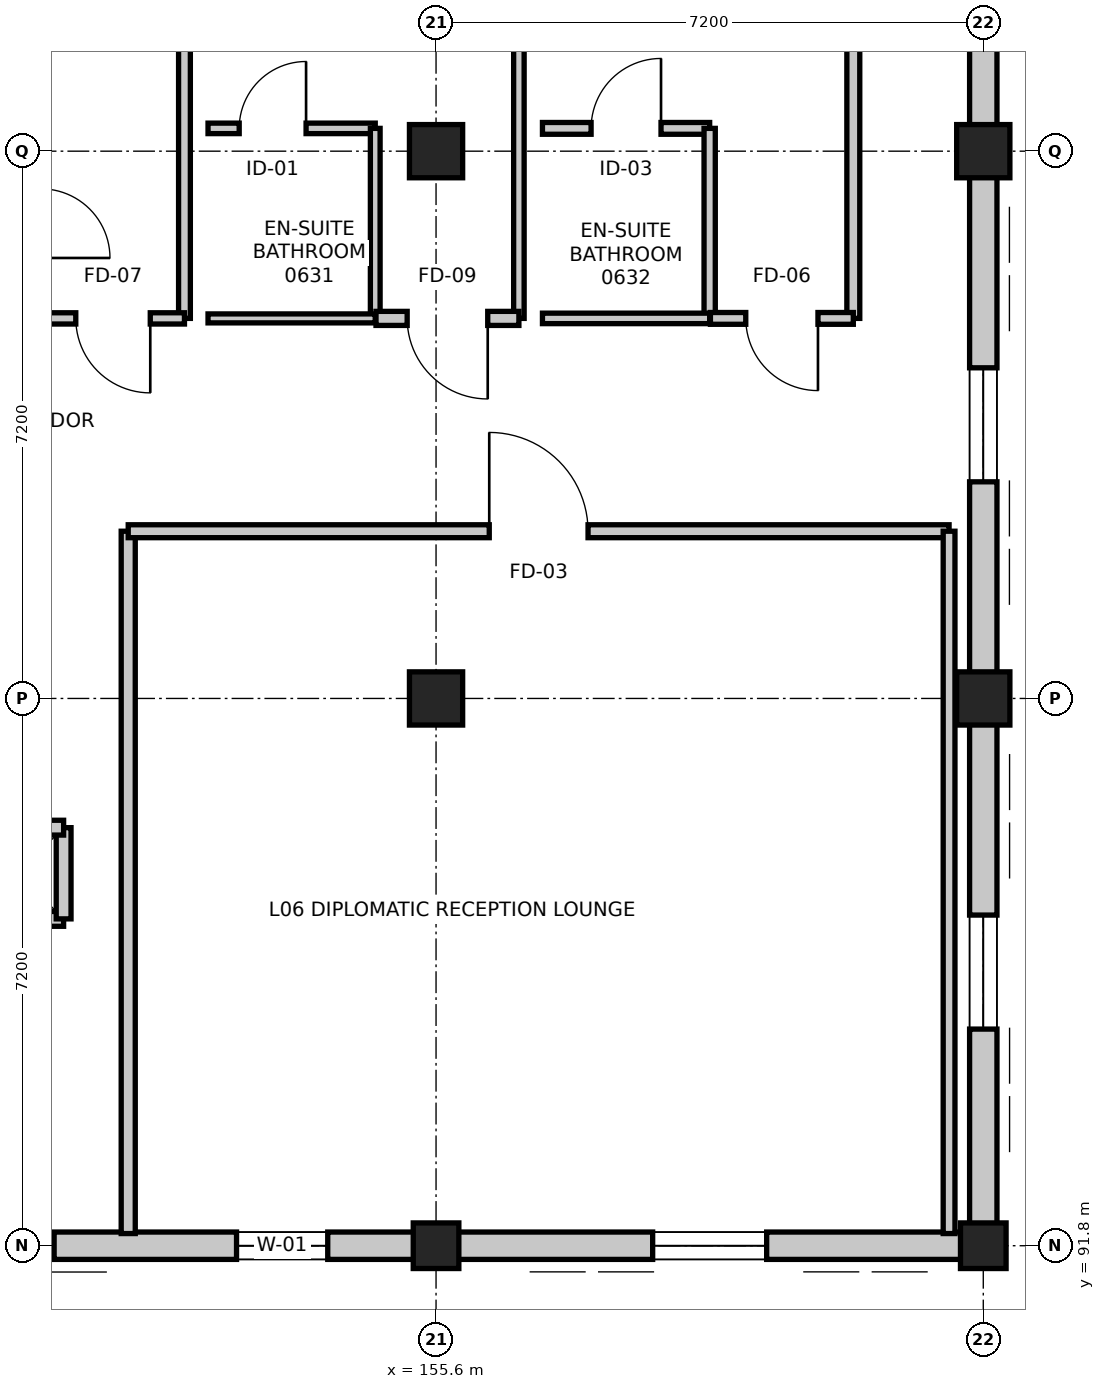
"""IFC4 building model, lengths in metres.
Left out: names, types, materials, properties, quantities, classifications, styles, units other than length and angle.
Written with IfcOpenShell. Run it as: python <this file> out.ifc"""

import sys

from ifc_helpers import new_model, si_unit, direction, frame, frame_2d, origin, origin_2d, place, context, subcontext, project, spatial, rectangle, extrude, element, fill, save


model = new_model("IFC4")
c1 = context("Model", 3, precision=1e-05, world=origin(), true_north=direction((0.0, 1.0)))
c2 = subcontext(c1, "Body", "Model", "MODEL_VIEW")
j1 = project(units=[si_unit("LENGTHUNIT", "METRE"), si_unit("PLANEANGLEUNIT", "RADIAN")], contexts=[c1])
p1 = place(None, origin())
s1 = spatial("IfcSite", under=j1, at=p1, CompositionType="ELEMENT")
p2 = place(p1, origin())
s2 = spatial("IfcBuilding", under=s1, at=p2, CompositionType="ELEMENT")
p3 = place(p2, frame((0.0, 0.0, 26.4)))
s3 = spatial("IfcBuildingStorey", under=s2, at=p3, CompositionType="ELEMENT", Elevation=26.4)
p4 = place(p3, frame((155.6, 91.8, 0.0), z_axis=(0.0, 0.0, 1.0), x_axis=(1.0, 0.0, 0.0)))
e1 = element("IfcColumn", 1, at=p4, inside=s3, PredefinedType="COLUMN", context=c2, shape_type="SweptSolid", body=[
    extrude(rectangle(XDim=0.6, YDim=0.6, at=origin_2d()), origin(), (0.0, 0.0, 1.0), 3.6),
])
for number, where, z_axis, x_axis in (
    (2, (155.6, 99.0, 0.0), (0.0, 0.0, 1.0), (1.0, 0.0, 0.0)),
    (3, (155.6, 106.2, 0.0), (0.0, 0.0, 1.0), (1.0, 0.0, 0.0)),
):
    element("IfcColumn", number, at=place(p3, frame(where, z_axis=z_axis, x_axis=x_axis)), inside=s3, PredefinedType="COLUMN", context=c2, shape_type="SweptSolid", body=[
        extrude(rectangle(XDim=0.7, YDim=0.7, at=origin_2d()), origin(), (0.0, 0.0, 1.0), 3.6),
    ])
p5 = place(p3, frame((162.8, 91.8, 0.0), z_axis=(0.0, 0.0, 1.0), x_axis=(1.0, 0.0, 0.0)))
e4 = element("IfcColumn", 4, at=p5, inside=s3, PredefinedType="COLUMN", context=c2, shape_type="SweptSolid", body=[
    extrude(rectangle(XDim=0.6, YDim=0.6, at=origin_2d()), origin(), (0.0, 0.0, 1.0), 3.6),
])
for number, where, z_axis, x_axis in (
    (5, (162.8, 99.0, 0.0), (0.0, 0.0, 1.0), (1.0, 0.0, 0.0)),
    (6, (162.8, 106.2, 0.0), (0.0, 0.0, 1.0), (1.0, 0.0, 0.0)),
):
    element("IfcColumn", number, at=place(p3, frame(where, z_axis=z_axis, x_axis=x_axis)), inside=s3, PredefinedType="COLUMN", context=c2, shape_type="SweptSolid", body=[
        extrude(rectangle(XDim=0.7, YDim=0.7, at=origin_2d()), origin(), (0.0, 0.0, 1.0), 3.6),
    ])
p6 = place(p3, frame((162.8, 113.4, 0.0), z_axis=(0.0, 0.0, 1.0), x_axis=(0.0, -1.0, 0.0)))
e7 = element("IfcWall", 7, at=p6, inside=s3, PredefinedType="STANDARD", context=c2, shape_type="SweptSolid", body=[
    extrude(rectangle(XDim=7.2, YDim=0.36, at=frame_2d((3.6, 0.0))), origin(), (0.0, 0.0, 1.0), 2.685),
])
p7 = place(p6, frame((2.85, 0.0, 0.75)))
e8 = element("IfcOpeningElement", 8, at=p7, cuts=e7, PredefinedType="OPENING", context=c2, shape_type="SweptSolid", body=[
    extrude(rectangle(XDim=1.5, YDim=1.5, at=frame_2d((0.75, 0.75))), frame((0.0, 0.19, 0.0), z_axis=(0.0, -1.0, 0.0), x_axis=(1.0, 0.0, 0.0)), (0.0, 0.0, 1.0), 0.38),
])
p8 = place(p3, frame((162.8, 106.2, 0.0), z_axis=(0.0, 0.0, 1.0), x_axis=(0.0, -1.0, 0.0)))
e9 = element("IfcWall", 9, at=p8, inside=s3, PredefinedType="STANDARD", context=c2, shape_type="SweptSolid", body=[
    extrude(rectangle(XDim=7.2, YDim=0.36, at=frame_2d((3.6, 0.0))), origin(), (0.0, 0.0, 1.0), 2.685),
])
p9 = place(p8, frame((2.85, 0.0, 0.75)))
e10 = element("IfcOpeningElement", 10, at=p9, cuts=e9, PredefinedType="OPENING", context=c2, shape_type="SweptSolid", body=[
    extrude(rectangle(XDim=1.5, YDim=1.5, at=frame_2d((0.75, 0.75))), frame((0.0, 0.19, 0.0), z_axis=(0.0, -1.0, 0.0), x_axis=(1.0, 0.0, 0.0)), (0.0, 0.0, 1.0), 0.38),
])
p10 = place(p3, frame((162.8, 99.0, 0.0), z_axis=(0.0, 0.0, 1.0), x_axis=(0.0, -1.0, 0.0)))
e11 = element("IfcWall", 11, at=p10, inside=s3, PredefinedType="STANDARD", context=c2, shape_type="SweptSolid", body=[
    extrude(rectangle(XDim=7.2, YDim=0.36, at=frame_2d((3.6, 0.0))), origin(), (0.0, 0.0, 1.0), 2.685),
])
p11 = place(p10, frame((2.85, 0.0, 0.75)))
e12 = element("IfcOpeningElement", 12, at=p11, cuts=e11, PredefinedType="OPENING", context=c2, shape_type="SweptSolid", body=[
    extrude(rectangle(XDim=1.5, YDim=1.5, at=frame_2d((0.75, 0.75))), frame((0.0, 0.19, 0.0), z_axis=(0.0, -1.0, 0.0), x_axis=(1.0, 0.0, 0.0)), (0.0, 0.0, 1.0), 0.38),
])
p12 = place(p3, frame((162.8, 91.8, 0.0), z_axis=(0.0, 0.0, 1.0), x_axis=(-1.0, 0.0, 0.0)))
e13 = element("IfcWall", 13, at=p12, inside=s3, PredefinedType="STANDARD", context=c2, shape_type="SweptSolid", body=[
    extrude(rectangle(XDim=7.2, YDim=0.36, at=frame_2d((3.6, 0.0))), origin(), (0.0, 0.0, 1.0), 2.735),
])
p13 = place(p12, frame((2.85, 0.0, 0.75)))
e14 = element("IfcOpeningElement", 14, at=p13, cuts=e13, PredefinedType="OPENING", context=c2, shape_type="SweptSolid", body=[
    extrude(rectangle(XDim=1.5, YDim=1.5, at=frame_2d((0.75, 0.75))), frame((0.0, 0.19, 0.0), z_axis=(0.0, -1.0, 0.0), x_axis=(1.0, 0.0, 0.0)), (0.0, 0.0, 1.0), 0.38),
])
p14 = place(p3, frame((155.6, 91.8, 0.0), z_axis=(0.0, 0.0, 1.0), x_axis=(-1.0, 0.0, 0.0)))
e15 = element("IfcWall", 15, at=p14, inside=s3, PredefinedType="STANDARD", context=c2, shape_type="SweptSolid", body=[
    extrude(rectangle(XDim=7.2, YDim=0.36, at=frame_2d((3.6, 0.0))), origin(), (0.0, 0.0, 1.0), 2.735),
])
p15 = place(p14, frame((1.425, 0.0, 0.75)))
e16 = element("IfcOpeningElement", 16, at=p15, cuts=e15, PredefinedType="OPENING", context=c2, shape_type="SweptSolid", body=[
    extrude(rectangle(XDim=1.2, YDim=1.5, at=frame_2d((0.6, 0.75))), frame((0.0, 0.19, 0.0), z_axis=(0.0, -1.0, 0.0), x_axis=(1.0, 0.0, 0.0)), (0.0, 0.0, 1.0), 0.38),
])
p16 = place(p14, frame((5.025, 0.0, 0.75)))
e17 = element("IfcOpeningElement", 17, at=p16, cuts=e15, PredefinedType="OPENING", context=c2, shape_type="SweptSolid", body=[
    extrude(rectangle(XDim=1.2, YDim=1.5, at=frame_2d((0.6, 0.75))), frame((0.0, 0.19, 0.0), z_axis=(0.0, -1.0, 0.0), x_axis=(1.0, 0.0, 0.0)), (0.0, 0.0, 1.0), 0.38),
])
for number, where, z_axis, x_axis in (
    (18, (149.5, 96.1, 0.0), (0.0, 0.0, 1.0), (1.0, 0.0, 0.0)),
    (19, (150.7, 96.1, 0.0), (0.0, 0.0, 1.0), (0.0, 1.0, 0.0)),
    (20, (150.7, 97.3, 0.0), (0.0, 0.0, 1.0), (-1.0, 0.0, 0.0)),
):
    element("IfcWall", number, at=place(p3, frame(where, z_axis=z_axis, x_axis=x_axis)), inside=s3, PredefinedType="PARAPET", context=c2, shape_type="SweptSolid", body=[
        extrude(rectangle(XDim=1.2, YDim=0.195, at=frame_2d((0.6, 0.0))), origin(), (0.0, 0.0, 1.0), 3.35),
    ])
p17 = place(p3, frame((151.55, 91.96, 0.0), z_axis=(0.0, 0.0, 1.0), x_axis=(0.0, 1.0, 0.0)))
e21 = element("IfcWall", 21, at=p17, inside=s3, PredefinedType="PARTITIONING", context=c2, shape_type="SweptSolid", body=[
    extrude(rectangle(XDim=9.24, YDim=0.185, at=frame_2d((4.62, 0.0))), origin(), (0.0, 0.0, 1.0), 2.735),
])
p18 = place(p3, frame((151.55, 101.2, 0.0), z_axis=(0.0, 0.0, 1.0), x_axis=(1.0, 0.0, 0.0)))
e22 = element("IfcWall", 22, at=p18, inside=s3, PredefinedType="PARTITIONING", context=c2, shape_type="SweptSolid", body=[
    extrude(rectangle(XDim=10.8, YDim=0.17, at=frame_2d((5.4, 0.0))), origin(), (0.0, 0.0, 1.0), 2.685),
])
p19 = place(p18, frame((4.75, 0.0, 0.0)))
e23 = element("IfcOpeningElement", 23, at=p19, cuts=e22, PredefinedType="OPENING", context=c2, shape_type="SweptSolid", body=[
    extrude(rectangle(XDim=1.3, YDim=2.15, at=frame_2d((0.65, 1.075))), frame((0.0, 0.095, 0.0), z_axis=(0.0, -1.0, 0.0), x_axis=(1.0, 0.0, 0.0)), (0.0, 0.0, 1.0), 0.19),
])
p20 = place(p3, frame((162.35, 101.2, 0.0), z_axis=(0.0, 0.0, 1.0), x_axis=(0.0, -1.0, 0.0)))
e24 = element("IfcWall", 24, at=p20, inside=s3, PredefinedType="PARTITIONING", context=c2, shape_type="SweptSolid", body=[
    extrude(rectangle(XDim=9.24, YDim=0.155, at=frame_2d((4.62, 0.0))), origin(), (0.0, 0.0, 1.0), 2.735),
])
p21 = place(p3, frame((152.29, 113.385, 0.0), z_axis=(0.0, 0.0, 1.0), x_axis=(0.0, -1.0, 0.0)))
e25 = element("IfcWall", 25, at=p21, inside=s3, PredefinedType="PARTITIONING", context=c2, shape_type="SweptSolid", body=[
    extrude(rectangle(XDim=9.385, YDim=0.155, at=frame_2d((4.692, 0.0))), origin(), (0.0, 0.0, 1.0), 2.735),
])
p22 = place(p3, frame((152.29, 104.0, 0.0), z_axis=(0.0, 0.0, 1.0), x_axis=(-1.0, 0.0, 0.0)))
e26 = element("IfcWall", 26, at=p22, inside=s3, PredefinedType="PARTITIONING", context=c2, shape_type="SweptSolid", body=[
    extrude(rectangle(XDim=1.88, YDim=0.148, at=frame_2d((0.94, 0.0))), origin(), (0.0, 0.0, 1.0), 3.35),
])
p23 = place(p22, frame((0.45, 0.0, 0.0)))
e27 = element("IfcOpeningElement", 27, at=p23, cuts=e26, PredefinedType="OPENING", context=c2, shape_type="SweptSolid", body=[
    extrude(rectangle(XDim=0.98, YDim=2.15, at=frame_2d((0.49, 1.075))), frame((0.0, 0.084, 0.0), z_axis=(0.0, -1.0, 0.0), x_axis=(1.0, 0.0, 0.0)), (0.0, 0.0, 1.0), 0.168),
])
p24 = place(p3, frame((152.6, 106.5, 0.0), z_axis=(0.0, 0.0, 1.0), x_axis=(1.0, 0.0, 0.0)))
e28 = element("IfcWall", 28, at=p24, inside=s3, PredefinedType="PARTITIONING", context=c2, shape_type="SweptSolid", body=[
    extrude(rectangle(XDim=2.2, YDim=0.138, at=frame_2d((1.1, 0.0))), origin(), (0.0, 0.0, 1.0), 3.35),
])
p25 = place(p24, frame((0.41, 0.0, 0.0)))
e29 = element("IfcOpeningElement", 29, at=p25, cuts=e28, PredefinedType="OPENING", context=c2, shape_type="SweptSolid", body=[
    extrude(rectangle(XDim=0.88, YDim=2.06, at=frame_2d((0.44, 1.03))), frame((0.0, 0.079, 0.0), z_axis=(0.0, -1.0, 0.0), x_axis=(1.0, 0.0, 0.0)), (0.0, 0.0, 1.0), 0.158),
])
p26 = place(p3, frame((154.8, 106.5, 0.0), z_axis=(0.0, 0.0, 1.0), x_axis=(0.0, -1.0, 0.0)))
e30 = element("IfcWall", 30, at=p26, inside=s3, PredefinedType="PARTITIONING", context=c2, shape_type="SweptSolid", body=[
    extrude(rectangle(XDim=2.5, YDim=0.128, at=frame_2d((1.25, 0.0))), origin(), (0.0, 0.0, 1.0), 2.735),
])
p27 = place(p3, frame((154.8, 104.0, 0.0), z_axis=(0.0, 0.0, 1.0), x_axis=(-1.0, 0.0, 0.0)))
e31 = element("IfcWall", 31, at=p27, inside=s3, PredefinedType="PARTITIONING", context=c2, shape_type="SweptSolid", body=[
    extrude(rectangle(XDim=2.2, YDim=0.118, at=frame_2d((1.1, 0.0))), origin(), (0.0, 0.0, 1.0), 3.35),
])
p28 = place(p3, frame((156.69, 113.152, 0.0), z_axis=(0.0, 0.0, 1.0), x_axis=(0.0, -1.0, 0.0)))
e32 = element("IfcWall", 32, at=p28, inside=s3, PredefinedType="PARTITIONING", context=c2, shape_type="SweptSolid", body=[
    extrude(rectangle(XDim=9.152, YDim=0.138, at=frame_2d((4.576, 0.0))), origin(), (0.0, 0.0, 1.0), 2.735),
])
p29 = place(p3, frame((156.69, 104.0, 0.0), z_axis=(0.0, 0.0, 1.0), x_axis=(-1.0, 0.0, 0.0)))
e33 = element("IfcWall", 33, at=p29, inside=s3, PredefinedType="PARTITIONING", context=c2, shape_type="SweptSolid", body=[
    extrude(rectangle(XDim=1.88, YDim=0.185, at=frame_2d((0.94, 0.0))), origin(), (0.0, 0.0, 1.0), 2.685),
])
p30 = place(p29, frame((0.41, 0.0, 0.0)))
e34 = element("IfcOpeningElement", 34, at=p30, cuts=e33, PredefinedType="OPENING", context=c2, shape_type="SweptSolid", body=[
    extrude(rectangle(XDim=1.06, YDim=2.2, at=frame_2d((0.53, 1.1))), frame((0.0, 0.103, 0.0), z_axis=(0.0, -1.0, 0.0), x_axis=(1.0, 0.0, 0.0)), (0.0, 0.0, 1.0), 0.205),
])
p31 = place(p3, frame((157.0, 106.5, 0.0), z_axis=(0.0, 0.0, 1.0), x_axis=(1.0, 0.0, 0.0)))
e35 = element("IfcWall", 35, at=p31, inside=s3, PredefinedType="PARTITIONING", context=c2, shape_type="SweptSolid", body=[
    extrude(rectangle(XDim=2.2, YDim=0.155, at=frame_2d((1.1, 0.0))), origin(), (0.0, 0.0, 1.0), 3.35),
])
p32 = place(p31, frame((0.64, 0.0, 0.0)))
e36 = element("IfcOpeningElement", 36, at=p32, cuts=e35, PredefinedType="OPENING", context=c2, shape_type="SweptSolid", body=[
    extrude(rectangle(XDim=0.92, YDim=2.1, at=frame_2d((0.46, 1.05))), frame((0.0, 0.087, 0.0), z_axis=(0.0, -1.0, 0.0), x_axis=(1.0, 0.0, 0.0)), (0.0, 0.0, 1.0), 0.175),
])
p33 = place(p3, frame((159.2, 106.5, 0.0), z_axis=(0.0, 0.0, 1.0), x_axis=(0.0, -1.0, 0.0)))
e37 = element("IfcWall", 37, at=p33, inside=s3, PredefinedType="PARTITIONING", context=c2, shape_type="SweptSolid", body=[
    extrude(rectangle(XDim=2.5, YDim=0.148, at=frame_2d((1.25, 0.0))), origin(), (0.0, 0.0, 1.0), 2.735),
])
p34 = place(p3, frame((159.2, 104.0, 0.0), z_axis=(0.0, 0.0, 1.0), x_axis=(-1.0, 0.0, 0.0)))
e38 = element("IfcWall", 38, at=p34, inside=s3, PredefinedType="PARTITIONING", context=c2, shape_type="SweptSolid", body=[
    extrude(rectangle(XDim=2.2, YDim=0.138, at=frame_2d((1.1, 0.0))), origin(), (0.0, 0.0, 1.0), 3.35),
])
p35 = place(p3, frame((161.09, 112.987, 0.0), z_axis=(0.0, 0.0, 1.0), x_axis=(0.0, -1.0, 0.0)))
e39 = element("IfcWall", 39, at=p35, inside=s3, PredefinedType="PARTITIONING", context=c2, shape_type="SweptSolid", body=[
    extrude(rectangle(XDim=8.987, YDim=0.17, at=frame_2d((4.493, 0.0))), origin(), (0.0, 0.0, 1.0), 2.735),
])
p36 = place(p3, frame((161.09, 104.0, 0.0), z_axis=(0.0, 0.0, 1.0), x_axis=(-1.0, 0.0, 0.0)))
e40 = element("IfcWall", 40, at=p36, inside=s3, PredefinedType="PARTITIONING", context=c2, shape_type="SweptSolid", body=[
    extrude(rectangle(XDim=1.88, YDim=0.155, at=frame_2d((0.94, 0.0))), origin(), (0.0, 0.0, 1.0), 3.35),
])
p37 = place(p36, frame((0.465, 0.0, 0.0)))
e41 = element("IfcOpeningElement", 41, at=p37, cuts=e40, PredefinedType="OPENING", context=c2, shape_type="SweptSolid", body=[
    extrude(rectangle(XDim=0.95, YDim=2.1, at=frame_2d((0.475, 1.05))), frame((0.0, 0.087, 0.0), z_axis=(0.0, -1.0, 0.0), x_axis=(1.0, 0.0, 0.0)), (0.0, 0.0, 1.0), 0.175),
])
p38 = place(p9, origin())
e42 = element("IfcWindow", 42, at=p38, inside=s3, PartitioningType="SINGLE_PANEL", PredefinedType="WINDOW", context=c2, shape_type="SweptSolid", body=[
    extrude(rectangle(XDim=1.5, YDim=1.5, at=frame_2d((0.75, 0.75))), frame((0.0, 0.03, 0.0), z_axis=(0.0, -1.0, 0.0), x_axis=(1.0, 0.0, 0.0)), (0.0, 0.0, 1.0), 0.06),
])
fill(e10, e42)
p39 = place(p11, origin())
e43 = element("IfcWindow", 43, at=p39, inside=s3, PartitioningType="SINGLE_PANEL", PredefinedType="WINDOW", context=c2, shape_type="SweptSolid", body=[
    extrude(rectangle(XDim=1.5, YDim=1.5, at=frame_2d((0.75, 0.75))), frame((0.0, 0.03, 0.0), z_axis=(0.0, -1.0, 0.0), x_axis=(1.0, 0.0, 0.0)), (0.0, 0.0, 1.0), 0.06),
])
fill(e12, e43)
p40 = place(p13, origin())
e44 = element("IfcWindow", 44, at=p40, inside=s3, PartitioningType="SINGLE_PANEL", PredefinedType="WINDOW", context=c2, shape_type="SweptSolid", body=[
    extrude(rectangle(XDim=1.5, YDim=1.5, at=frame_2d((0.75, 0.75))), frame((0.0, 0.03, 0.0), z_axis=(0.0, -1.0, 0.0), x_axis=(1.0, 0.0, 0.0)), (0.0, 0.0, 1.0), 0.06),
])
fill(e14, e44)
p41 = place(p15, origin())
e45 = element("IfcWindow", 45, at=p41, inside=s3, PartitioningType="SINGLE_PANEL", PredefinedType="WINDOW", context=c2, shape_type="SweptSolid", body=[
    extrude(rectangle(XDim=1.2, YDim=1.5, at=frame_2d((0.6, 0.75))), frame((0.0, 0.03, 0.0), z_axis=(0.0, -1.0, 0.0), x_axis=(1.0, 0.0, 0.0)), (0.0, 0.0, 1.0), 0.06),
])
fill(e16, e45)
p42 = place(p19, origin())
e46 = element("IfcDoor", 46, at=p42, inside=s3, OperationType="SINGLE_SWING_LEFT", PredefinedType="DOOR", context=c2, shape_type="SweptSolid", body=[
    extrude(rectangle(XDim=1.3, YDim=2.15, at=frame_2d((0.65, 1.075))), frame((0.0, 0.025, 0.0), z_axis=(0.0, -1.0, 0.0), x_axis=(1.0, 0.0, 0.0)), (0.0, 0.0, 1.0), 0.05),
])
fill(e23, e46)
p43 = place(p23, origin())
e47 = element("IfcDoor", 47, at=p43, inside=s3, OperationType="SINGLE_SWING_LEFT", PredefinedType="DOOR", context=c2, shape_type="SweptSolid", body=[
    extrude(rectangle(XDim=0.98, YDim=2.15, at=frame_2d((0.49, 1.075))), frame((0.0, 0.025, 0.0), z_axis=(0.0, -1.0, 0.0), x_axis=(1.0, 0.0, 0.0)), (0.0, 0.0, 1.0), 0.05),
])
fill(e27, e47)
p44 = place(p25, origin())
e48 = element("IfcDoor", 48, at=p44, inside=s3, OperationType="SINGLE_SWING_RIGHT", PredefinedType="DOOR", context=c2, shape_type="SweptSolid", body=[
    extrude(rectangle(XDim=0.88, YDim=2.06, at=frame_2d((0.44, 1.03))), frame((0.0, 0.025, 0.0), z_axis=(0.0, -1.0, 0.0), x_axis=(1.0, 0.0, 0.0)), (0.0, 0.0, 1.0), 0.05),
])
fill(e29, e48)
p45 = place(p30, origin())
e49 = element("IfcDoor", 49, at=p45, inside=s3, OperationType="SINGLE_SWING_LEFT", PredefinedType="DOOR", context=c2, shape_type="SweptSolid", body=[
    extrude(rectangle(XDim=1.06, YDim=2.2, at=frame_2d((0.53, 1.1))), frame((0.0, 0.025, 0.0), z_axis=(0.0, -1.0, 0.0), x_axis=(1.0, 0.0, 0.0)), (0.0, 0.0, 1.0), 0.05),
])
fill(e34, e49)
p46 = place(p32, origin())
e50 = element("IfcDoor", 50, at=p46, inside=s3, OperationType="SINGLE_SWING_RIGHT", PredefinedType="DOOR", context=c2, shape_type="SweptSolid", body=[
    extrude(rectangle(XDim=0.92, YDim=2.1, at=frame_2d((0.46, 1.05))), frame((0.0, 0.025, 0.0), z_axis=(0.0, -1.0, 0.0), x_axis=(1.0, 0.0, 0.0)), (0.0, 0.0, 1.0), 0.05),
])
fill(e36, e50)
p47 = place(p37, origin())
e51 = element("IfcDoor", 51, at=p47, inside=s3, OperationType="SINGLE_SWING_LEFT", PredefinedType="DOOR", context=c2, shape_type="SweptSolid", body=[
    extrude(rectangle(XDim=0.95, YDim=2.1, at=frame_2d((0.475, 1.05))), frame((0.0, 0.025, 0.0), z_axis=(0.0, -1.0, 0.0), x_axis=(1.0, 0.0, 0.0)), (0.0, 0.0, 1.0), 0.05),
])
fill(e41, e51)
p48 = place(p16, origin())
e52 = element("IfcWindow", 52, at=p48, inside=s3, PartitioningType="SINGLE_PANEL", PredefinedType="WINDOW", context=c2, shape_type="SweptSolid", body=[
    extrude(rectangle(XDim=1.2, YDim=1.5, at=frame_2d((0.6, 0.75))), frame((0.0, 0.03, 0.0), z_axis=(0.0, -1.0, 0.0), x_axis=(1.0, 0.0, 0.0)), (0.0, 0.0, 1.0), 0.06),
])
fill(e17, e52)
save(model, sys.argv[1])
